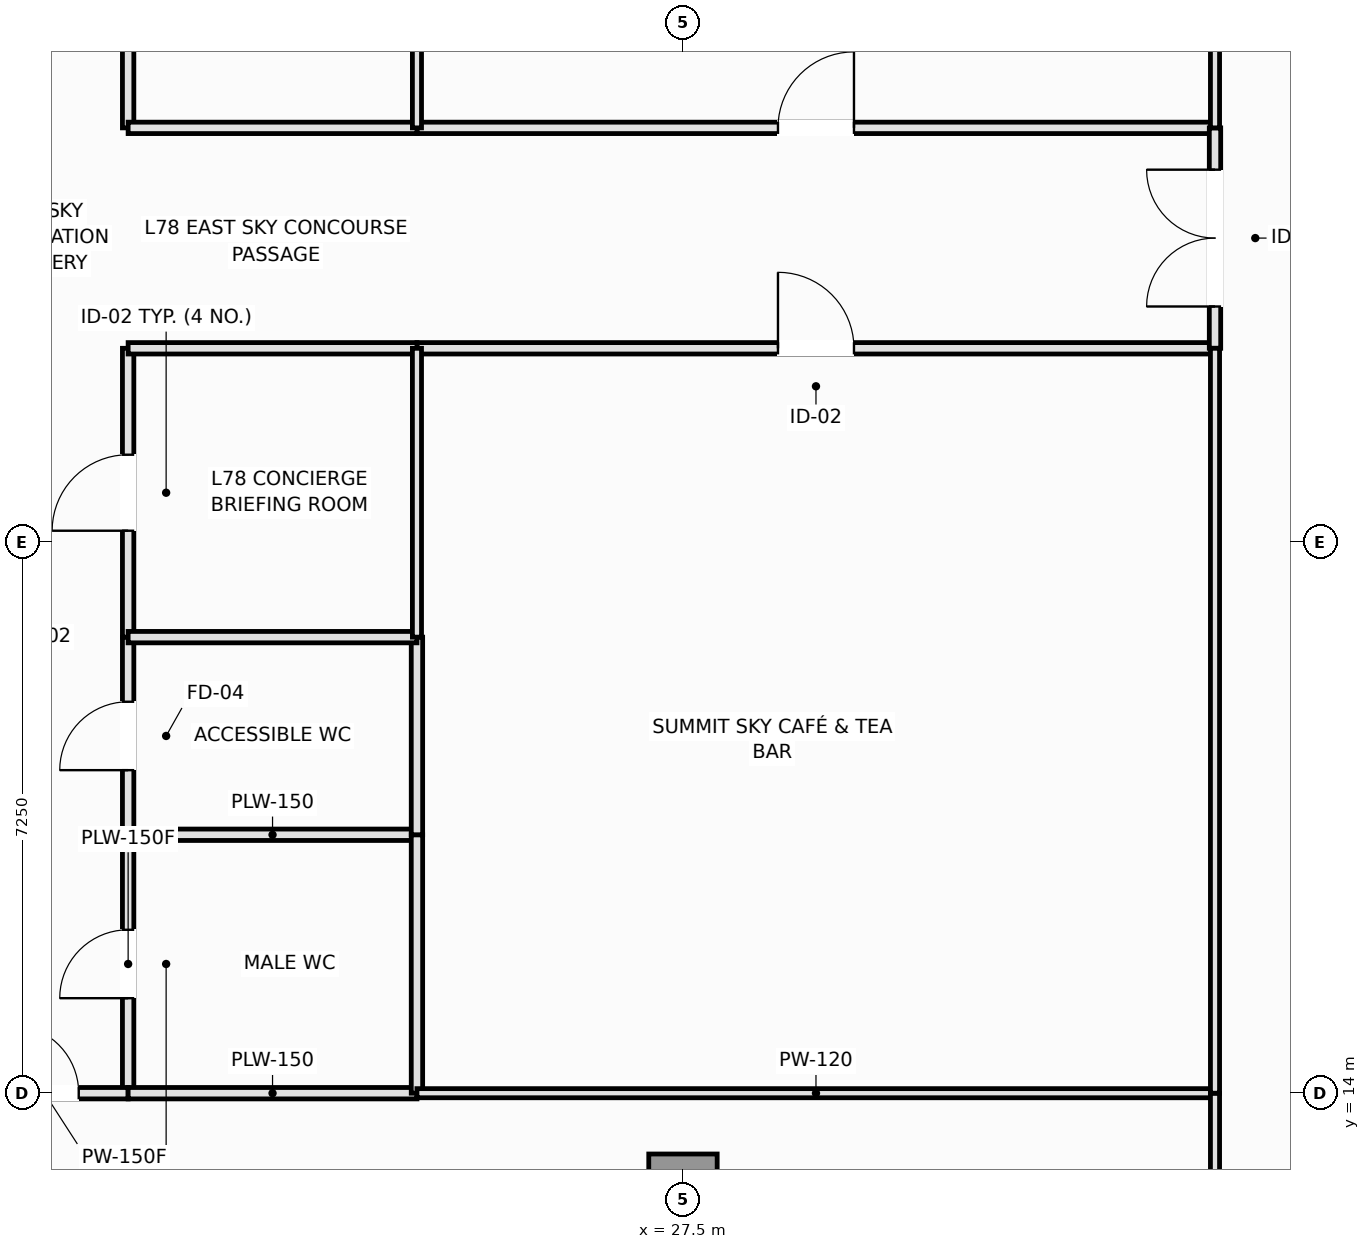
"""IFC4 building model, lengths in metres.
Left out: names, types, materials, properties, quantities, classifications, styles, units other than length and angle.
Written with IfcOpenShell. Run it as: python <this file> out.ifc"""

import sys

from ifc_helpers import new_model, si_unit, direction, frame, frame_2d, origin, origin_2d, place, context, subcontext, project, spatial, rectangle, extrude, element, fill, save


model = new_model("IFC4")
c1 = context("Model", 3, precision=1e-05, world=origin(), true_north=direction((0.0, 1.0)))
c2 = subcontext(c1, "Body", "Model", "MODEL_VIEW")
j1 = project(units=[si_unit("LENGTHUNIT", "METRE"), si_unit("PLANEANGLEUNIT", "RADIAN")], contexts=[c1])
p1 = place(None, origin())
s1 = spatial("IfcSite", under=j1, at=p1, CompositionType="ELEMENT")
p2 = place(p1, origin())
s2 = spatial("IfcBuilding", under=s1, at=p2, CompositionType="ELEMENT")
p3 = place(p2, frame((0.0, 0.0, 291.85)))
s3 = spatial("IfcBuildingStorey", under=s2, at=p3, CompositionType="ELEMENT", Elevation=291.85)
p4 = place(p3, frame((27.5, 12.75, 0.0), z_axis=(0.0, 0.0, 1.0), x_axis=(1.0, 0.0, 0.0)))
e1 = element("IfcColumn", 1, at=p4, inside=s3, PredefinedType="COLUMN", context=c2, shape_type="SweptSolid", body=[
    extrude(rectangle(XDim=0.9, YDim=0.9, at=origin_2d()), origin(), (0.0, 0.0, 1.0), 4.8),
])
p5 = place(p3, frame((20.2, 14.0, 0.0), z_axis=(0.0, 0.0, 1.0), x_axis=(0.0, 1.0, 0.0)))
e2 = element("IfcWall", 2, at=p5, inside=s3, PredefinedType="PLUMBINGWALL", context=c2, shape_type="SweptSolid", body=[
    extrude(rectangle(XDim=3.4, YDim=0.15, at=frame_2d((1.7, 0.0))), origin(), (0.0, 0.0, 1.0), 4.6),
])
p6 = place(p5, frame((1.25, 0.0, 0.0)))
e3 = element("IfcOpeningElement", 3, at=p6, cuts=e2, PredefinedType="OPENING", context=c2, shape_type="SweptSolid", body=[
    extrude(rectangle(XDim=0.9, YDim=2.1, at=frame_2d((0.45, 1.05))), frame((0.0, 0.085, 0.0), z_axis=(0.0, -1.0, 0.0), x_axis=(1.0, 0.0, 0.0)), (0.0, 0.0, 1.0), 0.17),
])
p7 = place(p3, frame((20.2, 17.4, 0.0), z_axis=(0.0, 0.0, 1.0), x_axis=(0.0, 1.0, 0.0)))
e4 = element("IfcWall", 4, at=p7, inside=s3, PredefinedType="PLUMBINGWALL", context=c2, shape_type="SweptSolid", body=[
    extrude(rectangle(XDim=2.6, YDim=0.15, at=frame_2d((1.3, 0.0))), origin(), (0.0, 0.0, 1.0), 4.6),
])
p8 = place(p7, frame((0.85, 0.0, 0.0)))
e5 = element("IfcOpeningElement", 5, at=p8, cuts=e4, PredefinedType="OPENING", context=c2, shape_type="SweptSolid", body=[
    extrude(rectangle(XDim=0.9, YDim=2.1, at=frame_2d((0.45, 1.05))), frame((0.0, 0.085, 0.0), z_axis=(0.0, -1.0, 0.0), x_axis=(1.0, 0.0, 0.0)), (0.0, 0.0, 1.0), 0.17),
])
p9 = place(p3, frame((18.0, 14.0, 0.0), z_axis=(0.0, 0.0, 1.0), x_axis=(1.0, 0.0, 0.0)))
e6 = element("IfcWall", 6, at=p9, inside=s3, PredefinedType="PARTITIONING", context=c2, shape_type="SweptSolid", body=[
    extrude(rectangle(XDim=2.2, YDim=0.15, at=frame_2d((1.1, 0.0))), origin(), (0.0, 0.0, 1.0), 4.6),
])
p10 = place(p9, frame((0.65, 0.0, 0.0)))
e7 = element("IfcOpeningElement", 7, at=p10, cuts=e6, PredefinedType="OPENING", context=c2, shape_type="SweptSolid", body=[
    extrude(rectangle(XDim=0.9, YDim=2.1, at=frame_2d((0.45, 1.05))), frame((0.0, 0.085, 0.0), z_axis=(0.0, -1.0, 0.0), x_axis=(1.0, 0.0, 0.0)), (0.0, 0.0, 1.0), 0.17),
])
p11 = place(p3, frame((20.2, 20.0, 0.0), z_axis=(0.0, 0.0, 1.0), x_axis=(0.0, 1.0, 0.0)))
e8 = element("IfcWall", 8, at=p11, inside=s3, PredefinedType="PARTITIONING", context=c2, shape_type="SweptSolid", body=[
    extrude(rectangle(XDim=3.8, YDim=0.15, at=frame_2d((1.9, 0.0))), origin(), (0.0, 0.0, 1.0), 4.6),
])
p12 = place(p11, frame((1.4, 0.0, 0.0)))
e9 = element("IfcOpeningElement", 9, at=p12, cuts=e8, PredefinedType="OPENING", context=c2, shape_type="SweptSolid", body=[
    extrude(rectangle(XDim=1.0, YDim=2.15, at=frame_2d((0.5, 1.075))), frame((0.0, 0.085, 0.0), z_axis=(0.0, -1.0, 0.0), x_axis=(1.0, 0.0, 0.0)), (0.0, 0.0, 1.0), 0.17),
])
p13 = place(p3, frame((20.2, 26.7, 0.0), z_axis=(0.0, 0.0, 1.0), x_axis=(0.0, 1.0, 0.0)))
e10 = element("IfcWall", 10, at=p13, inside=s3, PredefinedType="PARTITIONING", context=c2, shape_type="SweptSolid", body=[
    extrude(rectangle(XDim=3.8, YDim=0.15, at=frame_2d((1.9, 0.0))), origin(), (0.0, 0.0, 1.0), 4.6),
])
p14 = place(p13, frame((1.4, 0.0, 0.0)))
e11 = element("IfcOpeningElement", 11, at=p14, cuts=e10, PredefinedType="OPENING", context=c2, shape_type="SweptSolid", body=[
    extrude(rectangle(XDim=1.0, YDim=2.15, at=frame_2d((0.5, 1.075))), frame((0.0, 0.085, 0.0), z_axis=(0.0, -1.0, 0.0), x_axis=(1.0, 0.0, 0.0)), (0.0, 0.0, 1.0), 0.17),
])
p15 = place(p3, frame((24.0, 23.8, 0.0), z_axis=(0.0, 0.0, 1.0), x_axis=(1.0, 0.0, 0.0)))
e12 = element("IfcWall", 12, at=p15, inside=s3, PredefinedType="PARTITIONING", context=c2, shape_type="SweptSolid", body=[
    extrude(rectangle(XDim=10.5, YDim=0.15, at=frame_2d((5.25, 0.0))), origin(), (0.0, 0.0, 1.0), 4.6),
])
p16 = place(p15, frame((4.75, 0.0, 0.0)))
e13 = element("IfcOpeningElement", 13, at=p16, cuts=e12, PredefinedType="OPENING", context=c2, shape_type="SweptSolid", body=[
    extrude(rectangle(XDim=1.0, YDim=2.15, at=frame_2d((0.5, 1.075))), frame((0.0, 0.085, 0.0), z_axis=(0.0, -1.0, 0.0), x_axis=(1.0, 0.0, 0.0)), (0.0, 0.0, 1.0), 0.17),
])
p17 = place(p3, frame((24.0, 26.7, 0.0), z_axis=(0.0, 0.0, 1.0), x_axis=(1.0, 0.0, 0.0)))
e14 = element("IfcWall", 14, at=p17, inside=s3, PredefinedType="PARTITIONING", context=c2, shape_type="SweptSolid", body=[
    extrude(rectangle(XDim=10.5, YDim=0.15, at=frame_2d((5.25, 0.0))), origin(), (0.0, 0.0, 1.0), 4.6),
])
p18 = place(p17, frame((4.75, 0.0, 0.0)))
e15 = element("IfcOpeningElement", 15, at=p18, cuts=e14, PredefinedType="OPENING", context=c2, shape_type="SweptSolid", body=[
    extrude(rectangle(XDim=1.0, YDim=2.15, at=frame_2d((0.5, 1.075))), frame((0.0, 0.085, 0.0), z_axis=(0.0, -1.0, 0.0), x_axis=(1.0, 0.0, 0.0)), (0.0, 0.0, 1.0), 0.17),
])
p19 = place(p3, frame((34.5, 23.8, 0.0), z_axis=(0.0, 0.0, 1.0), x_axis=(0.0, 1.0, 0.0)))
e16 = element("IfcWall", 16, at=p19, inside=s3, PredefinedType="PARTITIONING", context=c2, shape_type="SweptSolid", body=[
    extrude(rectangle(XDim=2.9, YDim=0.15, at=frame_2d((1.45, 0.0))), origin(), (0.0, 0.0, 1.0), 4.6),
])
p20 = place(p19, frame((0.55, 0.0, 0.0)))
e17 = element("IfcOpeningElement", 17, at=p20, cuts=e16, PredefinedType="OPENING", context=c2, shape_type="SweptSolid", body=[
    extrude(rectangle(XDim=1.8, YDim=2.2, at=frame_2d((0.9, 1.1))), frame((0.0, 0.085, 0.0), z_axis=(0.0, -1.0, 0.0), x_axis=(1.0, 0.0, 0.0)), (0.0, 0.0, 1.0), 0.17),
])
for number, where, z_axis, x_axis in (
    (18, (20.2, 23.8, 0.0), (0.0, 0.0, 1.0), (1.0, 0.0, 0.0)),
    (19, (20.2, 26.7, 0.0), (0.0, 0.0, 1.0), (1.0, 0.0, 0.0)),
):
    element("IfcWall", number, at=place(p3, frame(where, z_axis=z_axis, x_axis=x_axis)), inside=s3, PredefinedType="PARTITIONING", context=c2, shape_type="SweptSolid", body=[
        extrude(rectangle(XDim=3.8, YDim=0.15, at=frame_2d((1.9, 0.0))), origin(), (0.0, 0.0, 1.0), 4.6),
    ])
for number, where, z_axis, x_axis in (
    (20, (20.2, 17.4, 0.0), (0.0, 0.0, 1.0), (1.0, 0.0, 0.0)),
    (21, (20.2, 14.0, 0.0), (0.0, 0.0, 1.0), (1.0, 0.0, 0.0)),
):
    element("IfcWall", number, at=place(p3, frame(where, z_axis=z_axis, x_axis=x_axis)), inside=s3, PredefinedType="PLUMBINGWALL", context=c2, shape_type="SweptSolid", body=[
        extrude(rectangle(XDim=3.8, YDim=0.15, at=frame_2d((1.9, 0.0))), origin(), (0.0, 0.0, 1.0), 4.6),
    ])
p21 = place(p3, frame((24.0, 14.0, 0.0), z_axis=(0.0, 0.0, 1.0), x_axis=(0.0, 1.0, 0.0)))
e22 = element("IfcWall", 22, at=p21, inside=s3, PredefinedType="PLUMBINGWALL", context=c2, shape_type="SweptSolid", body=[
    extrude(rectangle(XDim=3.4, YDim=0.15, at=frame_2d((1.7, 0.0))), origin(), (0.0, 0.0, 1.0), 4.15),
])
p22 = place(p3, frame((24.0, 17.4, 0.0), z_axis=(0.0, 0.0, 1.0), x_axis=(0.0, 1.0, 0.0)))
e23 = element("IfcWall", 23, at=p22, inside=s3, PredefinedType="PLUMBINGWALL", context=c2, shape_type="SweptSolid", body=[
    extrude(rectangle(XDim=2.6, YDim=0.15, at=frame_2d((1.3, 0.0))), origin(), (0.0, 0.0, 1.0), 4.15),
])
p23 = place(p3, frame((20.2, 20.0, 0.0), z_axis=(0.0, 0.0, 1.0), x_axis=(1.0, 0.0, 0.0)))
e24 = element("IfcWall", 24, at=p23, inside=s3, PredefinedType="PLUMBINGWALL", context=c2, shape_type="SweptSolid", body=[
    extrude(rectangle(XDim=3.8, YDim=0.15, at=frame_2d((1.9, 0.0))), origin(), (0.0, 0.0, 1.0), 4.6),
])
p24 = place(p3, frame((24.0, 14.0, 0.0), z_axis=(0.0, 0.0, 1.0), x_axis=(1.0, 0.0, 0.0)))
e25 = element("IfcWall", 25, at=p24, inside=s3, PredefinedType="PARTITIONING", context=c2, shape_type="SweptSolid", body=[
    extrude(rectangle(XDim=10.5, YDim=0.12, at=frame_2d((5.25, 0.0))), origin(), (0.0, 0.0, 1.0), 4.6),
])
p25 = place(p3, frame((34.5, 6.01, 0.0), z_axis=(0.0, 0.0, 1.0), x_axis=(0.0, 1.0, 0.0)))
e26 = element("IfcWall", 26, at=p25, inside=s3, PredefinedType="PARTITIONING", context=c2, shape_type="SweptSolid", body=[
    extrude(rectangle(XDim=7.99, YDim=0.12, at=frame_2d((3.995, 0.0))), origin(), (0.0, 0.0, 1.0), 4.15),
])
p26 = place(p3, frame((34.5, 14.0, 0.0), z_axis=(0.0, 0.0, 1.0), x_axis=(0.0, 1.0, 0.0)))
e27 = element("IfcWall", 27, at=p26, inside=s3, PredefinedType="PARTITIONING", context=c2, shape_type="SweptSolid", body=[
    extrude(rectangle(XDim=9.8, YDim=0.12, at=frame_2d((4.9, 0.0))), origin(), (0.0, 0.0, 1.0), 4.6),
])
p27 = place(p3, frame((24.0, 20.0, 0.0), z_axis=(0.0, 0.0, 1.0), x_axis=(0.0, 1.0, 0.0)))
e28 = element("IfcWall", 28, at=p27, inside=s3, PredefinedType="PARTITIONING", context=c2, shape_type="SweptSolid", body=[
    extrude(rectangle(XDim=3.8, YDim=0.12, at=frame_2d((1.9, 0.0))), origin(), (0.0, 0.0, 1.0), 4.15),
])
p28 = place(p3, frame((34.5, 26.7, 0.0), z_axis=(0.0, 0.0, 1.0), x_axis=(0.0, 1.0, 0.0)))
e29 = element("IfcWall", 29, at=p28, inside=s3, PredefinedType="PARTITIONING", context=c2, shape_type="SweptSolid", body=[
    extrude(rectangle(XDim=9.8, YDim=0.12, at=frame_2d((4.9, 0.0))), origin(), (0.0, 0.0, 1.0), 4.6),
])
p29 = place(p3, frame((24.0, 26.7, 0.0), z_axis=(0.0, 0.0, 1.0), x_axis=(0.0, 1.0, 0.0)))
e30 = element("IfcWall", 30, at=p29, inside=s3, PredefinedType="PARTITIONING", context=c2, shape_type="SweptSolid", body=[
    extrude(rectangle(XDim=3.8, YDim=0.12, at=frame_2d((1.9, 0.0))), origin(), (0.0, 0.0, 1.0), 4.15),
])
p30 = place(p6, origin())
e31 = element("IfcDoor", 31, at=p30, inside=s3, OperationType="SINGLE_SWING_LEFT", PredefinedType="DOOR", context=c2, shape_type="SweptSolid", body=[
    extrude(rectangle(XDim=0.9, YDim=2.1, at=frame_2d((0.45, 1.05))), frame((0.0, 0.025, 0.0), z_axis=(0.0, -1.0, 0.0), x_axis=(1.0, 0.0, 0.0)), (0.0, 0.0, 1.0), 0.05),
])
fill(e3, e31)
p31 = place(p8, origin())
e32 = element("IfcDoor", 32, at=p31, inside=s3, OperationType="SINGLE_SWING_LEFT", PredefinedType="DOOR", context=c2, shape_type="SweptSolid", body=[
    extrude(rectangle(XDim=0.9, YDim=2.1, at=frame_2d((0.45, 1.05))), frame((0.0, 0.025, 0.0), z_axis=(0.0, -1.0, 0.0), x_axis=(1.0, 0.0, 0.0)), (0.0, 0.0, 1.0), 0.05),
])
fill(e5, e32)
p32 = place(p10, origin())
e33 = element("IfcDoor", 33, at=p32, inside=s3, OperationType="SINGLE_SWING_LEFT", PredefinedType="DOOR", context=c2, shape_type="SweptSolid", body=[
    extrude(rectangle(XDim=0.9, YDim=2.1, at=frame_2d((0.45, 1.05))), frame((0.0, 0.025, 0.0), z_axis=(0.0, -1.0, 0.0), x_axis=(1.0, 0.0, 0.0)), (0.0, 0.0, 1.0), 0.05),
])
fill(e7, e33)
p33 = place(p12, origin())
e34 = element("IfcDoor", 34, at=p33, inside=s3, OperationType="SINGLE_SWING_LEFT", PredefinedType="DOOR", context=c2, shape_type="SweptSolid", body=[
    extrude(rectangle(XDim=1.0, YDim=2.15, at=frame_2d((0.5, 1.075))), frame((0.0, 0.025, 0.0), z_axis=(0.0, -1.0, 0.0), x_axis=(1.0, 0.0, 0.0)), (0.0, 0.0, 1.0), 0.05),
])
fill(e9, e34)
p34 = place(p16, origin())
e35 = element("IfcDoor", 35, at=p34, inside=s3, OperationType="SINGLE_SWING_LEFT", PredefinedType="DOOR", context=c2, shape_type="SweptSolid", body=[
    extrude(rectangle(XDim=1.0, YDim=2.15, at=frame_2d((0.5, 1.075))), frame((0.0, 0.025, 0.0), z_axis=(0.0, -1.0, 0.0), x_axis=(1.0, 0.0, 0.0)), (0.0, 0.0, 1.0), 0.05),
])
fill(e13, e35)
p35 = place(p18, origin())
e36 = element("IfcDoor", 36, at=p35, inside=s3, OperationType="SINGLE_SWING_RIGHT", PredefinedType="DOOR", context=c2, shape_type="SweptSolid", body=[
    extrude(rectangle(XDim=1.0, YDim=2.15, at=frame_2d((0.5, 1.075))), frame((0.0, 0.025, 0.0), z_axis=(0.0, -1.0, 0.0), x_axis=(1.0, 0.0, 0.0)), (0.0, 0.0, 1.0), 0.05),
])
fill(e15, e36)
p36 = place(p20, origin())
e37 = element("IfcDoor", 37, at=p36, inside=s3, OperationType="DOUBLE_DOOR_SINGLE_SWING", PredefinedType="DOOR", context=c2, shape_type="SweptSolid", body=[
    extrude(rectangle(XDim=1.8, YDim=2.2, at=frame_2d((0.9, 1.1))), frame((0.0, 0.025, 0.0), z_axis=(0.0, -1.0, 0.0), x_axis=(1.0, 0.0, 0.0)), (0.0, 0.0, 1.0), 0.05),
])
fill(e17, e37)
save(model, sys.argv[1])
